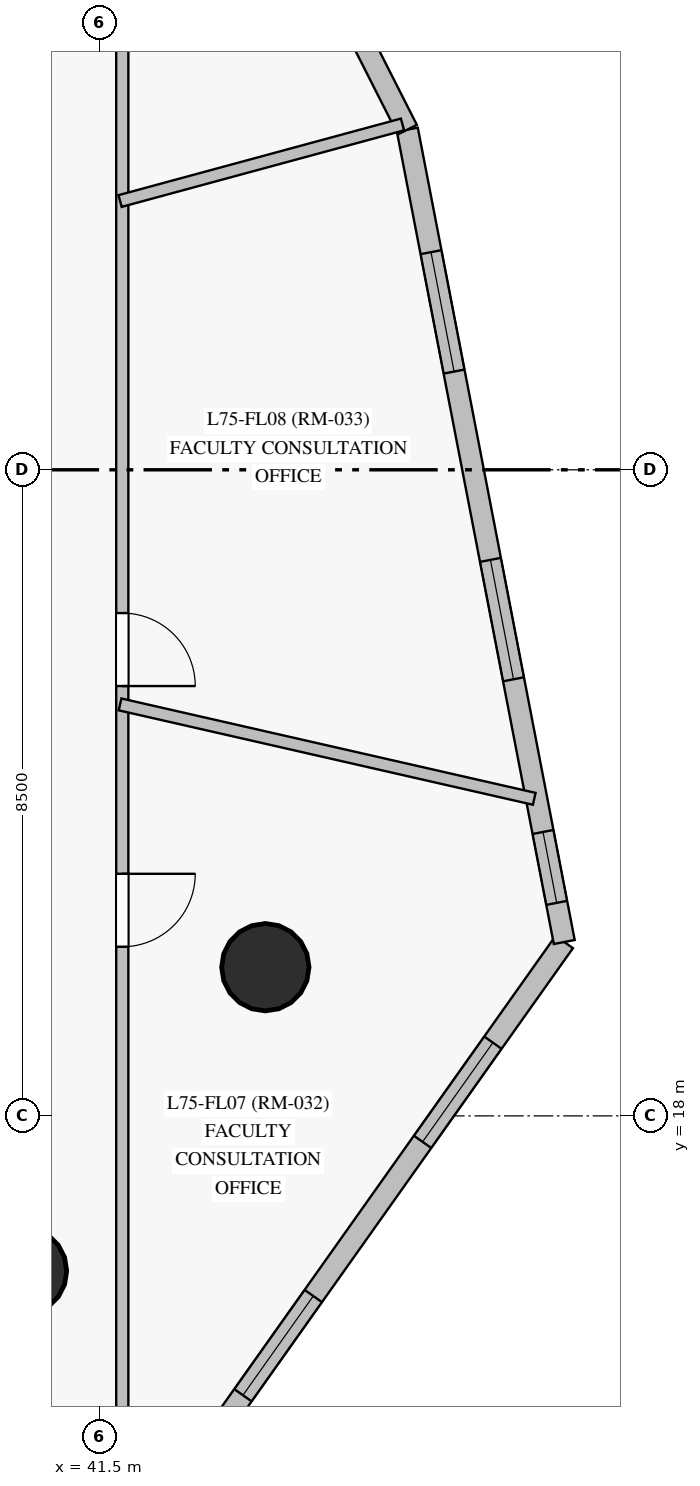
"""IFC4 building model, lengths in metres.
Left out: names, types, materials, properties, quantities, classifications, styles, units other than length and angle.
Written with IfcOpenShell. Run it as: python <this file> out.ifc"""

import sys

from ifc_helpers import new_model, si_unit, direction, frame, frame_2d, origin, origin_with_axes, origin_2d, place, context, subcontext, project, spatial, rectangle, circle, extrude, source, transform, mapped, element, fill, save


model = new_model("IFC4")
c1 = context("Model", 3, precision=1e-05, world=origin(), true_north=direction((0.0, 1.0)))
c2 = subcontext(c1, "Body", "Model", "MODEL_VIEW")
j1 = project(units=[si_unit("LENGTHUNIT", "METRE"), si_unit("PLANEANGLEUNIT", "RADIAN")], contexts=[c1])
p1 = place(None, origin())
s1 = spatial("IfcSite", under=j1, at=p1, CompositionType="ELEMENT")
p2 = place(p1, origin())
s2 = spatial("IfcBuilding", under=s1, at=p2, CompositionType="ELEMENT")
p3 = place(p2, frame((0.0, 0.0, 253.5)))
s3 = spatial("IfcBuildingStorey", under=s2, at=p3, CompositionType="ELEMENT", Elevation=253.5)
m1 = source(origin_with_axes(), c2, "Body", "SweptSolid", [
    extrude(circle(Radius=0.575, at=origin_2d()), origin(), (0.0, 0.0, 1.0), 3.05),
])
for number, where, z_axis, x_axis in (
    (1, (43.682, 19.956, 0.0), (0.0, 0.0, 1.0), (1.0, 0.0, 0.0)),
    (2, (40.494, 15.96, 0.0), (0.0, 0.0, 1.0), (1.0, 0.0, 0.0)),
):
    element("IfcColumn", number, at=place(p3, frame(where, z_axis=z_axis, x_axis=x_axis)), inside=s3, PredefinedType="COLUMN", context=c2, shape_type="MappedRepresentation", body=[
        mapped(m1, transform((0.0, 0.0, 0.0), scale=1.0)),
    ])
p4 = place(p3, frame((42.449, 13.001, 0.0), z_axis=(0.0, 0.0, 1.0), x_axis=(0.578346431581, 0.815791275436, 0.0)))
e3 = element("IfcWall", 3, at=p4, inside=s3, PredefinedType="SOLIDWALL", context=c2, shape_type="SweptSolid", body=[
    extrude(rectangle(XDim=8.932, YDim=0.28, at=frame_2d((4.466, 0.0))), origin(), (0.0, 0.0, 1.0), 2.85),
])
p5 = place(p4, frame((1.623, 0.0, 0.85)))
e4 = element("IfcOpeningElement", 4, at=p5, cuts=e3, PredefinedType="OPENING", context=c2, shape_type="SweptSolid", body=[
    extrude(rectangle(XDim=1.6, YDim=1.6, at=frame_2d((0.8, 0.8))), frame((0.0, 0.15, 0.0), z_axis=(0.0, -1.0, 0.0), x_axis=(1.0, 0.0, 0.0)), (0.0, 0.0, 1.0), 0.3),
])
p6 = place(p4, frame((5.709, 0.0, 0.85)))
e5 = element("IfcOpeningElement", 5, at=p6, cuts=e3, PredefinedType="OPENING", context=c2, shape_type="SweptSolid", body=[
    extrude(rectangle(XDim=1.6, YDim=1.6, at=frame_2d((0.8, 0.8))), frame((0.0, 0.15, 0.0), z_axis=(0.0, -1.0, 0.0), x_axis=(1.0, 0.0, 0.0)), (0.0, 0.0, 1.0), 0.3),
])
p7 = place(p3, frame((47.615, 20.288, 0.0), z_axis=(0.0, 0.0, 1.0), x_axis=(-0.189663427648, 0.981849165714, 0.0)))
e6 = element("IfcWall", 6, at=p7, inside=s3, PredefinedType="SOLIDWALL", context=c2, shape_type="SweptSolid", body=[
    extrude(rectangle(XDim=10.885, YDim=0.28, at=frame_2d((5.442, 0.0))), origin(), (0.0, 0.0, 1.0), 2.85),
])
p8 = place(p7, frame((0.524, 0.0, 0.85)))
e7 = element("IfcOpeningElement", 7, at=p8, cuts=e6, PredefinedType="OPENING", context=c2, shape_type="SweptSolid", body=[
    extrude(rectangle(XDim=0.95, YDim=1.5, at=frame_2d((0.475, 0.75))), frame((0.0, 0.15, 0.0), z_axis=(0.0, -1.0, 0.0), x_axis=(1.0, 0.0, 0.0)), (0.0, 0.0, 1.0), 0.3),
])
p9 = place(p7, frame((3.52, 0.0, 0.85)))
e8 = element("IfcOpeningElement", 8, at=p9, cuts=e6, PredefinedType="OPENING", context=c2, shape_type="SweptSolid", body=[
    extrude(rectangle(XDim=1.6, YDim=1.6, at=frame_2d((0.8, 0.8))), frame((0.0, 0.15, 0.0), z_axis=(0.0, -1.0, 0.0), x_axis=(1.0, 0.0, 0.0)), (0.0, 0.0, 1.0), 0.3),
])
p10 = place(p7, frame((7.643, 0.0, 0.85)))
e9 = element("IfcOpeningElement", 9, at=p10, cuts=e6, PredefinedType="OPENING", context=c2, shape_type="SweptSolid", body=[
    extrude(rectangle(XDim=1.6, YDim=1.6, at=frame_2d((0.8, 0.8))), frame((0.0, 0.15, 0.0), z_axis=(0.0, -1.0, 0.0), x_axis=(1.0, 0.0, 0.0)), (0.0, 0.0, 1.0), 0.3),
])
p11 = place(p3, frame((45.55, 30.975, 0.0), z_axis=(0.0, 0.0, 1.0), x_axis=(-0.45213236111, 0.891950855169, 0.0)))
e10 = element("IfcWall", 10, at=p11, inside=s3, PredefinedType="SOLIDWALL", context=c2, shape_type="SweptSolid", body=[
    extrude(rectangle(XDim=7.435, YDim=0.28, at=frame_2d((3.717, 0.0))), origin(), (0.0, 0.0, 1.0), 2.85),
])
p12 = place(p11, frame((2.936, 0.0, 0.85)))
e11 = element("IfcOpeningElement", 11, at=p12, cuts=e10, PredefinedType="OPENING", context=c2, shape_type="SweptSolid", body=[
    extrude(rectangle(XDim=1.6, YDim=1.6, at=frame_2d((0.8, 0.8))), frame((0.0, 0.15, 0.0), z_axis=(0.0, -1.0, 0.0), x_axis=(1.0, 0.0, 0.0)), (0.0, 0.0, 1.0), 0.3),
])
p13 = place(p3, frame((41.8, 33.45, 0.0), z_axis=(0.0, 0.0, 1.0), x_axis=(0.0, -1.0, 0.0)))
e12 = element("IfcWall", 12, at=p13, inside=s3, PredefinedType="PARTITIONING", context=c2, shape_type="SweptSolid", body=[
    extrude(rectangle(XDim=19.6, YDim=0.16, at=frame_2d((9.8, 0.0))), origin(), (0.0, 0.0, 1.0), 2.3),
])
p14 = place(p13, frame((12.265, 0.0, 0.0)))
e13 = element("IfcOpeningElement", 13, at=p14, cuts=e12, PredefinedType="OPENING", context=c2, shape_type="SweptSolid", body=[
    extrude(rectangle(XDim=0.96, YDim=2.15, at=frame_2d((0.48, 1.075))), frame((0.0, 0.09, 0.0), z_axis=(0.0, -1.0, 0.0), x_axis=(1.0, 0.0, 0.0)), (0.0, 0.0, 1.0), 0.18),
])
p15 = place(p13, frame((8.835, 0.0, 0.0)))
e14 = element("IfcOpeningElement", 14, at=p15, cuts=e12, PredefinedType="OPENING", context=c2, shape_type="SweptSolid", body=[
    extrude(rectangle(XDim=0.96, YDim=2.15, at=frame_2d((0.48, 1.075))), frame((0.0, 0.09, 0.0), z_axis=(0.0, -1.0, 0.0), x_axis=(1.0, 0.0, 0.0)), (0.0, 0.0, 1.0), 0.18),
])
p16 = place(p3, frame((41.771, 23.414, 0.0), z_axis=(0.0, 0.0, 1.0), x_axis=(0.974986314241, -0.222264902857, 0.0)))
e15 = element("IfcWall", 15, at=p16, inside=s3, PredefinedType="PARTITIONING", context=c2, shape_type="SweptSolid", body=[
    extrude(rectangle(XDim=5.589, YDim=0.16, at=frame_2d((2.794, 0.0))), origin(), (0.0, 0.0, 1.0), 2.85),
])
p17 = place(p3, frame((41.771, 30.036, 0.0), z_axis=(0.0, 0.0, 1.0), x_axis=(0.965154989502, 0.261678899112, 0.0)))
e16 = element("IfcWall", 16, at=p17, inside=s3, PredefinedType="PARTITIONING", context=c2, shape_type="SweptSolid", body=[
    extrude(rectangle(XDim=3.849, YDim=0.16, at=frame_2d((1.925, 0.0))), origin(), (0.0, 0.0, 1.0), 2.85),
])
m2 = source(origin_with_axes(), c2, "Body", "SweptSolid", [
    extrude(rectangle(XDim=1.6, YDim=1.6, at=frame_2d((0.8, 0.8))), frame((0.0, 0.03, 0.0), z_axis=(0.0, -1.0, 0.0), x_axis=(1.0, 0.0, 0.0)), (0.0, 0.0, 1.0), 0.06),
])
p18 = place(p5, origin())
e17 = element("IfcWindow", 17, at=p18, inside=s3, PartitioningType="SINGLE_PANEL", PredefinedType="WINDOW", context=c2, shape_type="MappedRepresentation", body=[
    mapped(m2, transform((0.0, 0.0, 0.0), scale=1.0)),
])
fill(e4, e17)
p19 = place(p6, origin())
e18 = element("IfcWindow", 18, at=p19, inside=s3, PartitioningType="SINGLE_PANEL", PredefinedType="WINDOW", context=c2, shape_type="MappedRepresentation", body=[
    mapped(m2, transform((0.0, 0.0, 0.0), scale=1.0)),
])
fill(e5, e18)
m3 = source(origin_with_axes(), c2, "Body", "SweptSolid", [
    extrude(rectangle(XDim=0.95, YDim=1.5, at=frame_2d((0.475, 0.75))), frame((0.0, 0.03, 0.0), z_axis=(0.0, -1.0, 0.0), x_axis=(1.0, 0.0, 0.0)), (0.0, 0.0, 1.0), 0.06),
])
p20 = place(p8, origin())
e19 = element("IfcWindow", 19, at=p20, inside=s3, PartitioningType="SINGLE_PANEL", PredefinedType="WINDOW", context=c2, shape_type="MappedRepresentation", body=[
    mapped(m3, transform((0.0, 0.0, 0.0), scale=1.0)),
])
fill(e7, e19)
p21 = place(p9, origin())
e20 = element("IfcWindow", 20, at=p21, inside=s3, PartitioningType="SINGLE_PANEL", PredefinedType="WINDOW", context=c2, shape_type="MappedRepresentation", body=[
    mapped(m2, transform((0.0, 0.0, 0.0), scale=1.0)),
])
fill(e8, e20)
p22 = place(p10, origin())
e21 = element("IfcWindow", 21, at=p22, inside=s3, PartitioningType="SINGLE_PANEL", PredefinedType="WINDOW", context=c2, shape_type="MappedRepresentation", body=[
    mapped(m2, transform((0.0, 0.0, 0.0), scale=1.0)),
])
fill(e9, e21)
m4 = source(origin_with_axes(), c2, "Body", "SweptSolid", [
    extrude(rectangle(XDim=0.96, YDim=2.15, at=frame_2d((0.48, 1.075))), frame((0.0, 0.025, 0.0), z_axis=(0.0, -1.0, 0.0), x_axis=(1.0, 0.0, 0.0)), (0.0, 0.0, 1.0), 0.05),
])
p23 = place(p14, origin())
e22 = element("IfcDoor", 22, at=p23, inside=s3, OperationType="SINGLE_SWING_LEFT", PredefinedType="DOOR", context=c2, shape_type="MappedRepresentation", body=[
    mapped(m4, transform((0.0, 0.0, 0.0), scale=1.0)),
])
fill(e13, e22)
p24 = place(p15, origin())
e23 = element("IfcDoor", 23, at=p24, inside=s3, OperationType="SINGLE_SWING_RIGHT", PredefinedType="DOOR", context=c2, shape_type="MappedRepresentation", body=[
    mapped(m4, transform((0.0, 0.0, 0.0), scale=1.0)),
])
fill(e14, e23)
save(model, sys.argv[1])
